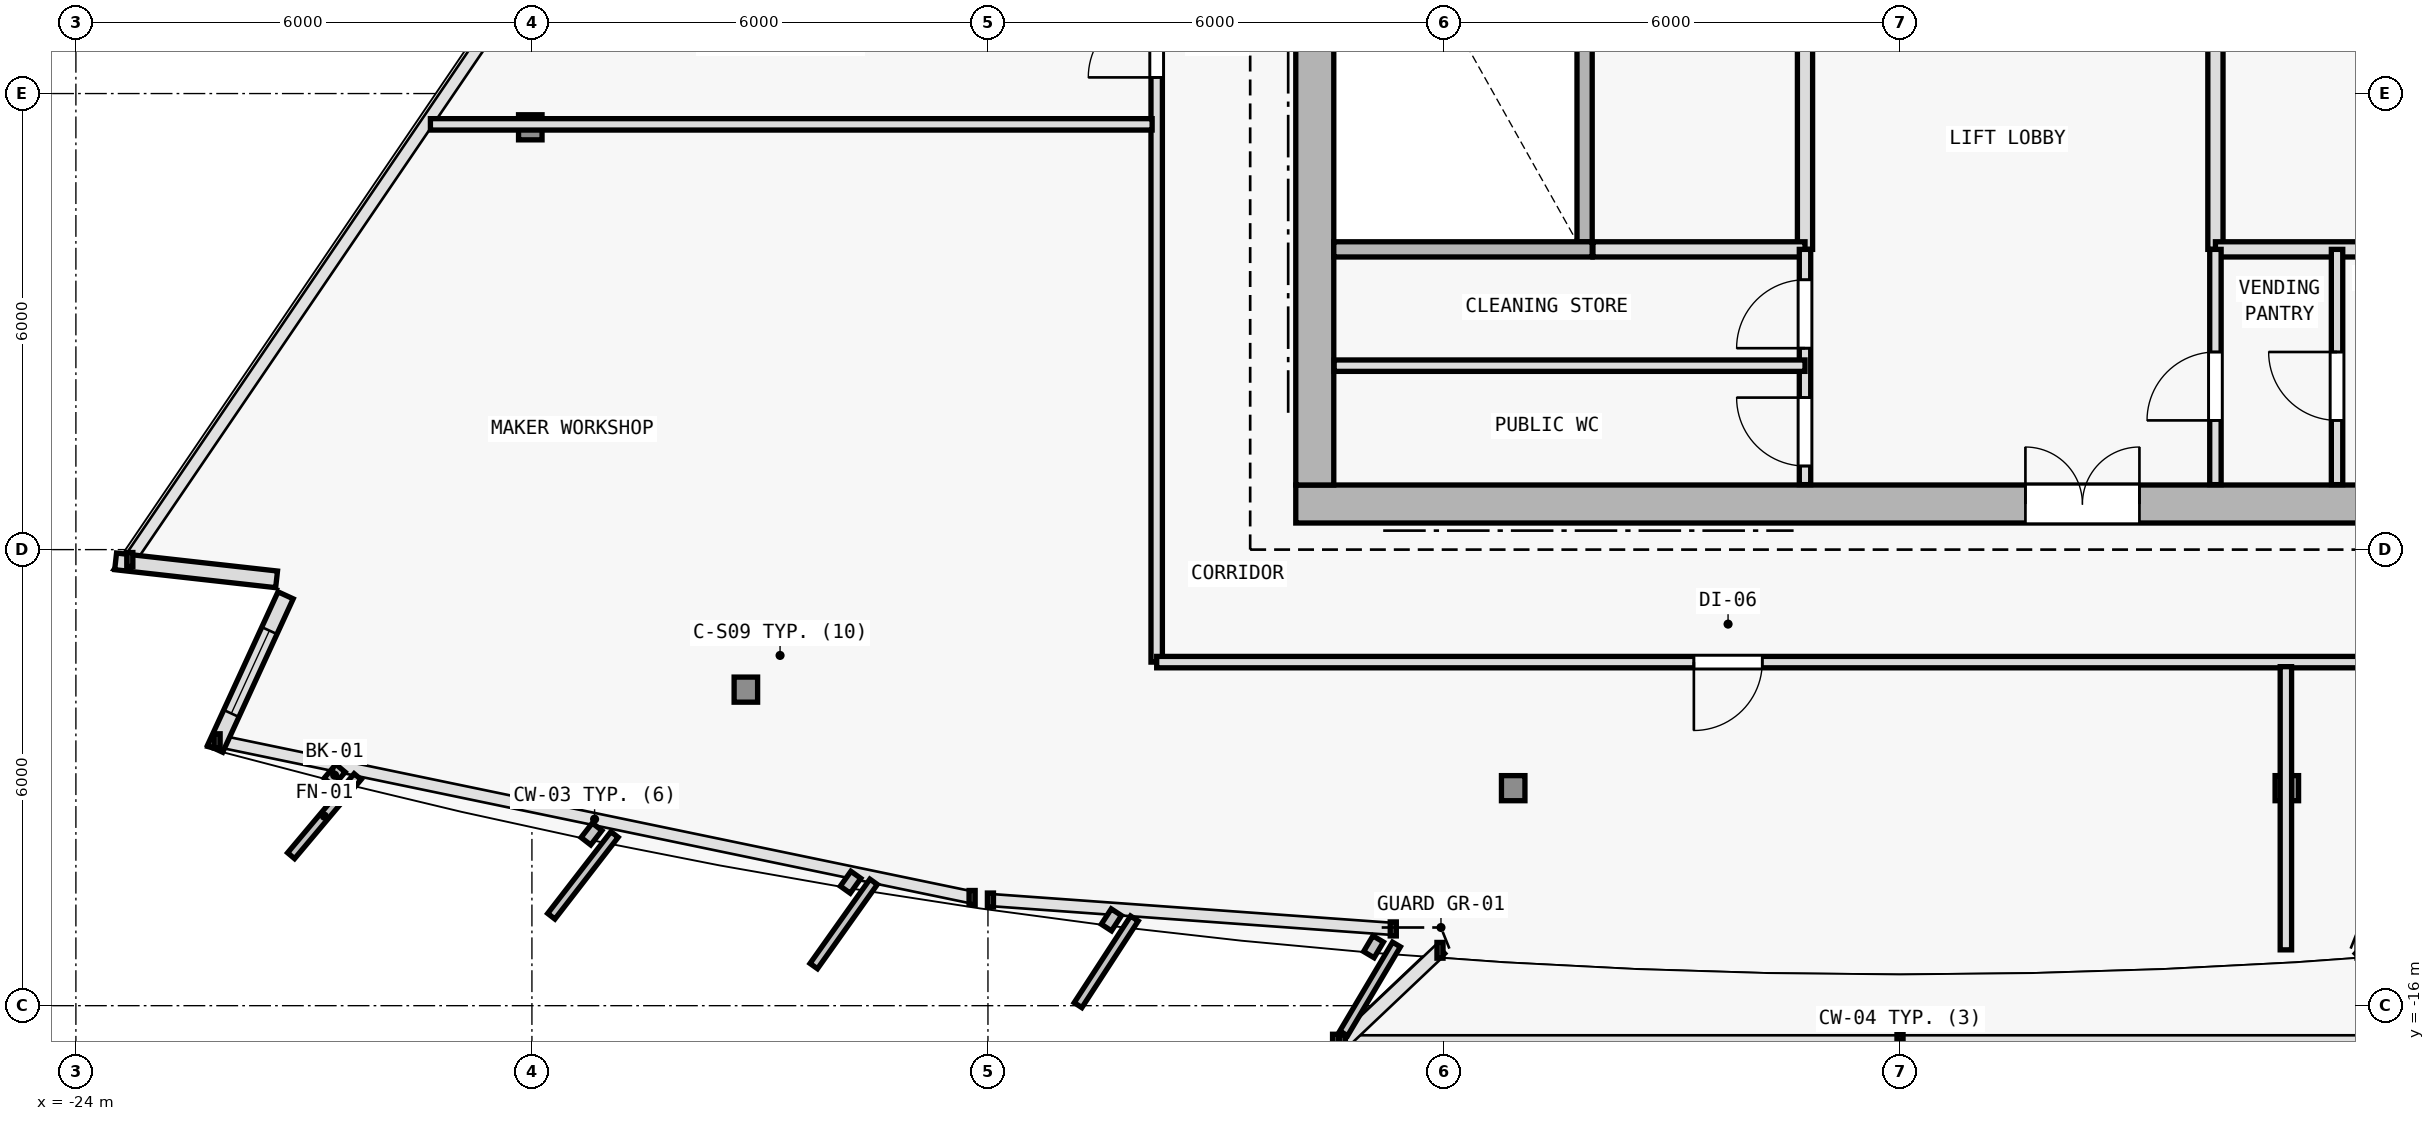
"""IFC4 building model, lengths in metres.
Left out: names, types, materials, properties, quantities, classifications, styles, units other than length and angle.
Written with IfcOpenShell. Run it as: python <this file> out.ifc"""

import sys

from ifc_helpers import new_model, si_unit, direction, frame, frame_2d, origin, origin_2d, place, context, subcontext, project, spatial, rectangle, i_section, extrude, element, fill, save


model = new_model("IFC4")
c1 = context("Model", 3, precision=1e-05, world=origin(), true_north=direction((0.0, 1.0)))
c2 = subcontext(c1, "Body", "Model", "MODEL_VIEW")
j1 = project(units=[si_unit("LENGTHUNIT", "METRE"), si_unit("PLANEANGLEUNIT", "RADIAN")], contexts=[c1])
p1 = place(None, origin())
s1 = spatial("IfcSite", under=j1, at=p1, CompositionType="ELEMENT")
p2 = place(p1, origin())
s2 = spatial("IfcBuilding", under=s1, at=p2, CompositionType="ELEMENT")
p3 = place(p2, frame((0.0, 0.0, 286.8)))
s3 = spatial("IfcBuildingStorey", under=s2, at=p3, CompositionType="ELEMENT", Elevation=286.8)
for number, where, z_axis, x_axis in (
    (1, (-7.7, -9.4, 0.0), (0.0, 0.0, 1.0), (1.0, 0.0, 0.0)),
    (2, (0.0, -9.4, 0.0), (0.0, 0.0, 1.0), (1.0, 0.0, 0.0)),
):
    element("IfcColumn", number, at=place(p3, frame(where, z_axis=z_axis, x_axis=x_axis)), inside=s3, PredefinedType="COLUMN", context=c2, shape_type="SweptSolid", body=[
        extrude(i_section(OverallWidth=0.374, OverallDepth=0.372, WebThickness=0.012, FlangeThickness=0.02, FilletRadius=0.015, at=origin_2d()), origin(), (0.0, 0.0, 1.0), 3.6),
    ])
p4 = place(p3, frame((-15.185, -11.842, 0.005), z_axis=(0.020662834962, 0.033509136961, 0.999224792022), x_axis=(-0.851183725565, 0.524867855115, 0.0)))
e3 = element("IfcColumn", 3, at=p4, inside=s3, PredefinedType="COLUMN", context=c2, shape_type="SweptSolid", body=[
    extrude(i_section(OverallWidth=0.309, OverallDepth=0.33, WebThickness=0.011, FlangeThickness=0.019, FilletRadius=0.027, at=origin_2d()), origin(), (0.0, 0.0, 1.0), 3.592),
])
for number, where, z_axis, x_axis in (
    (4, (-5.089, -13.138, 0.005), (0.007, 0.035, 0.999), (-0.982, 0.191, 0.0)),
    (5, (5.089, -13.138, 0.005), (-0.007, 0.035, 0.999), (-0.982, -0.191, 0.0)),
):
    element("IfcColumn", number, at=place(p3, frame(where, z_axis=z_axis, x_axis=x_axis)), inside=s3, PredefinedType="COLUMN", context=c2, shape_type="SweptSolid", body=[
        extrude(i_section(OverallWidth=0.309, OverallDepth=0.33, WebThickness=0.011, FlangeThickness=0.019, FilletRadius=0.027, at=origin_2d()), origin(), (0.0, 0.0, 1.0), 3.592),
    ])
p5 = place(p3, frame((-18.021, -4.444, 0.005), z_axis=(0.025222449659, 0.021619242565, 0.999448065876), x_axis=(-0.650791373456, 0.759256602365, 0.0)))
e6 = element("IfcColumn", 6, at=p5, inside=s3, PredefinedType="COLUMN", context=c2, shape_type="SweptSolid", body=[
    extrude(i_section(OverallWidth=0.309, OverallDepth=0.33, WebThickness=0.011, FlangeThickness=0.019, FilletRadius=0.027, at=origin_2d()), origin(), (0.0, 0.0, 1.0), 3.591),
])
p6 = place(p3, frame((-21.36, -10.391, 0.0), z_axis=(0.0, 0.0, 1.0), x_axis=(-0.993817888275, 0.111022542511, 0.0)))
e7 = element("IfcWall", 7, at=p6, inside=s3, PredefinedType="SOLIDWALL", context=c2, shape_type="SweptSolid", body=[
    extrude(rectangle(XDim=2.131, YDim=0.22, at=frame_2d((1.065, 0.0))), origin(), (0.0, 0.0, 1.0), 3.35),
])
p7 = place(p3, frame((-22.168, -12.62, 0.0), z_axis=(0.0, 0.0, 1.0), x_axis=(0.417426589535, 0.908710648308, 0.0)))
e8 = element("IfcWall", 8, at=p7, inside=s3, PredefinedType="SOLIDWALL", context=c2, shape_type="SweptSolid", body=[
    extrude(rectangle(XDim=2.221, YDim=0.22, at=frame_2d((1.111, 0.0))), origin(), (0.0, 0.0, 1.0), 3.35),
])
p8 = place(p7, frame((0.511, 0.0, 0.62)))
e9 = element("IfcOpeningElement", 9, at=p8, cuts=e8, PredefinedType="OPENING", context=c2, shape_type="SweptSolid", body=[
    extrude(rectangle(XDim=1.2, YDim=1.8, at=frame_2d((0.6, 0.9))), frame((0.0, 0.12, 0.0), z_axis=(0.0, -1.0, 0.0), x_axis=(1.0, 0.0, 0.0)), (0.0, 0.0, 1.0), 0.24),
])
p9 = place(p3, frame((-7.95, -9.4, 0.0), z_axis=(0.0, 0.0, 1.0), x_axis=(1.0, 0.0, 0.0)))
e10 = element("IfcWall", 10, at=p9, inside=s3, PredefinedType="SHEAR", context=c2, shape_type="SweptSolid", body=[
    extrude(rectangle(XDim=15.9, YDim=0.5, at=frame_2d((7.95, 0.0))), origin(), (0.0, 0.0, 1.0), 3.35),
])
p10 = place(p9, frame((9.6, 0.0, 0.0)))
e11 = element("IfcOpeningElement", 11, at=p10, cuts=e10, PredefinedType="OPENING", context=c2, shape_type="SweptSolid", body=[
    extrude(rectangle(XDim=1.5, YDim=2.2, at=frame_2d((0.75, 1.1))), frame((0.0, 0.26, 0.0), z_axis=(0.0, -1.0, 0.0), x_axis=(1.0, 0.0, 0.0)), (0.0, 0.0, 1.0), 0.52),
])
p11 = place(p3, frame((-7.7, -9.15, 0.0), z_axis=(0.0, 0.0, 1.0), x_axis=(0.0, 1.0, 0.0)))
e12 = element("IfcWall", 12, at=p11, inside=s3, PredefinedType="SHEAR", context=c2, shape_type="SweptSolid", body=[
    extrude(rectangle(XDim=19.1, YDim=0.5, at=frame_2d((9.55, 0.0))), origin(), (0.0, 0.0, 1.0), 3.35),
])
p12 = place(p11, frame((12.7, 0.0, 0.0)))
e13 = element("IfcOpeningElement", 13, at=p12, cuts=e12, PredefinedType="OPENING", context=c2, shape_type="SweptSolid", body=[
    extrude(rectangle(XDim=1.1, YDim=2.15, at=frame_2d((0.55, 1.075))), frame((0.0, 0.26, 0.0), z_axis=(0.0, -1.0, 0.0), x_axis=(1.0, 0.0, 0.0)), (0.0, 0.0, 1.0), 0.52),
])
p13 = place(p3, frame((-4.15, -5.95, 0.0), z_axis=(0.0, 0.0, 1.0), x_axis=(0.0, 1.0, 0.0)))
e14 = element("IfcWall", 14, at=p13, inside=s3, PredefinedType="SOLIDWALL", context=c2, shape_type="SweptSolid", body=[
    extrude(rectangle(XDim=7.2, YDim=0.2, at=frame_2d((3.6, 0.0))), origin(), (0.0, 0.0, 1.0), 3.35),
])
p14 = place(p3, frame((4.15, -6.05, 0.0), z_axis=(0.0, 0.0, 1.0), x_axis=(0.0, 1.0, 0.0)))
e15 = element("IfcWall", 15, at=p14, inside=s3, PredefinedType="SOLIDWALL", context=c2, shape_type="SweptSolid", body=[
    extrude(rectangle(XDim=8.7, YDim=0.2, at=frame_2d((4.35, 0.0))), origin(), (0.0, 0.0, 1.0), 3.35),
])
p15 = place(p14, frame((3.6, 0.0, 0.0)))
e16 = element("IfcOpeningElement", 16, at=p15, cuts=e15, PredefinedType="OPENING", context=c2, shape_type="SweptSolid", body=[
    extrude(rectangle(XDim=0.95, YDim=2.1, at=frame_2d((0.475, 1.05))), frame((0.0, 0.11, 0.0), z_axis=(0.0, -1.0, 0.0), x_axis=(1.0, 0.0, 0.0)), (0.0, 0.0, 1.0), 0.22),
])
p16 = place(p3, frame((-1.25, -6.05, 0.0), z_axis=(0.0, 0.0, 1.0), x_axis=(0.0, 1.0, 0.0)))
e17 = element("IfcWall", 17, at=p16, inside=s3, PredefinedType="SOLIDWALL", context=c2, shape_type="SweptSolid", body=[
    extrude(rectangle(XDim=8.7, YDim=0.2, at=frame_2d((4.35, 0.0))), origin(), (0.0, 0.0, 1.0), 3.35),
])
p17 = place(p16, frame((3.4, 0.0, 0.0)))
e18 = element("IfcOpeningElement", 18, at=p17, cuts=e17, PredefinedType="OPENING", context=c2, shape_type="SweptSolid", body=[
    extrude(rectangle(XDim=0.95, YDim=2.1, at=frame_2d((0.475, 1.05))), frame((0.0, 0.11, 0.0), z_axis=(0.0, -1.0, 0.0), x_axis=(1.0, 0.0, 0.0)), (0.0, 0.0, 1.0), 0.22),
])
p18 = place(p3, frame((-7.45, -6.05, 0.0), z_axis=(0.0, 0.0, 1.0), x_axis=(1.0, 0.0, 0.0)))
e19 = element("IfcWall", 19, at=p18, inside=s3, PredefinedType="SOLIDWALL", context=c2, shape_type="SweptSolid", body=[
    extrude(rectangle(XDim=3.4, YDim=0.2, at=frame_2d((1.7, 0.0))), origin(), (0.0, 0.0, 1.0), 3.35),
])
p19 = place(p3, frame((-4.04, -6.05, 0.0), z_axis=(0.0, 0.0, 1.0), x_axis=(1.0, 0.0, 0.0)))
e20 = element("IfcWall", 20, at=p19, inside=s3, PredefinedType="SOLIDWALL", context=c2, shape_type="SweptSolid", body=[
    extrude(rectangle(XDim=2.79, YDim=0.2, at=frame_2d((1.395, 0.0))), origin(), (0.0, 0.0, 1.0), 3.35),
])
p20 = place(p3, frame((4.15, -6.05, 0.0), z_axis=(0.0, 0.0, 1.0), x_axis=(1.0, 0.0, 0.0)))
e21 = element("IfcWall", 21, at=p20, inside=s3, PredefinedType="SOLIDWALL", context=c2, shape_type="SweptSolid", body=[
    extrude(rectangle(XDim=3.295, YDim=0.2, at=frame_2d((1.647, 0.0))), origin(), (0.0, 0.0, 1.0), 3.35),
])
p21 = place(p3, frame((-1.25, -9.145, 0.0), z_axis=(0.0, 0.0, 1.0), x_axis=(0.0, 1.0, 0.0)))
e22 = element("IfcWall", 22, at=p21, inside=s3, PredefinedType="PARTITIONING", context=c2, shape_type="SweptSolid", body=[
    extrude(rectangle(XDim=3.095, YDim=0.15, at=frame_2d((1.547, 0.0))), origin(), (0.0, 0.0, 1.0), 3.35),
])
p22 = place(p21, frame((1.795, 0.0, 0.0)))
e23 = element("IfcOpeningElement", 23, at=p22, cuts=e22, PredefinedType="OPENING", context=c2, shape_type="SweptSolid", body=[
    extrude(rectangle(XDim=0.9, YDim=2.1, at=frame_2d((0.45, 1.05))), frame((0.0, 0.085, 0.0), z_axis=(0.0, -1.0, 0.0), x_axis=(1.0, 0.0, 0.0)), (0.0, 0.0, 1.0), 0.17),
])
p23 = place(p21, frame((0.245, 0.0, 0.0)))
e24 = element("IfcOpeningElement", 24, at=p23, cuts=e22, PredefinedType="OPENING", context=c2, shape_type="SweptSolid", body=[
    extrude(rectangle(XDim=0.9, YDim=2.1, at=frame_2d((0.45, 1.05))), frame((0.0, 0.085, 0.0), z_axis=(0.0, -1.0, 0.0), x_axis=(1.0, 0.0, 0.0)), (0.0, 0.0, 1.0), 0.17),
])
p24 = place(p3, frame((4.15, -9.145, 0.0), z_axis=(0.0, 0.0, 1.0), x_axis=(0.0, 1.0, 0.0)))
e25 = element("IfcWall", 25, at=p24, inside=s3, PredefinedType="PARTITIONING", context=c2, shape_type="SweptSolid", body=[
    extrude(rectangle(XDim=3.095, YDim=0.15, at=frame_2d((1.547, 0.0))), origin(), (0.0, 0.0, 1.0), 3.35),
])
p25 = place(p24, frame((0.845, 0.0, 0.0)))
e26 = element("IfcOpeningElement", 26, at=p25, cuts=e25, PredefinedType="OPENING", context=c2, shape_type="SweptSolid", body=[
    extrude(rectangle(XDim=0.9, YDim=2.1, at=frame_2d((0.45, 1.05))), frame((0.0, 0.085, 0.0), z_axis=(0.0, -1.0, 0.0), x_axis=(1.0, 0.0, 0.0)), (0.0, 0.0, 1.0), 0.17),
])
p26 = place(p3, frame((-7.445, -7.58, 0.0), z_axis=(0.0, 0.0, 1.0), x_axis=(1.0, 0.0, 0.0)))
e27 = element("IfcWall", 27, at=p26, inside=s3, PredefinedType="PARTITIONING", context=c2, shape_type="SweptSolid", body=[
    extrude(rectangle(XDim=6.195, YDim=0.15, at=frame_2d((3.098, 0.0))), origin(), (0.0, 0.0, 1.0), 3.35),
])
p27 = place(p3, frame((5.75, -9.145, 0.0), z_axis=(0.0, 0.0, 1.0), x_axis=(0.0, 1.0, 0.0)))
e28 = element("IfcWall", 28, at=p27, inside=s3, PredefinedType="PARTITIONING", context=c2, shape_type="SweptSolid", body=[
    extrude(rectangle(XDim=3.095, YDim=0.15, at=frame_2d((1.547, 0.0))), origin(), (0.0, 0.0, 1.0), 3.35),
])
p28 = place(p27, frame((0.845, 0.0, 0.0)))
e29 = element("IfcOpeningElement", 29, at=p28, cuts=e28, PredefinedType="OPENING", context=c2, shape_type="SweptSolid", body=[
    extrude(rectangle(XDim=0.9, YDim=2.1, at=frame_2d((0.45, 1.05))), frame((0.0, 0.085, 0.0), z_axis=(0.0, -1.0, 0.0), x_axis=(1.0, 0.0, 0.0)), (0.0, 0.0, 1.0), 0.17),
])
p29 = place(p3, frame((-9.78, -11.48, 0.0), z_axis=(0.0, 0.0, 1.0), x_axis=(0.0, 1.0, 0.0)))
e30 = element("IfcWall", 30, at=p29, inside=s3, PredefinedType="PARTITIONING", context=c2, shape_type="SweptSolid", body=[
    extrude(rectangle(XDim=19.706, YDim=0.15, at=frame_2d((9.853, 0.0))), origin(), (0.0, 0.0, 1.0), 2.875),
])
p30 = place(p29, frame((9.901, 0.0, 0.0)))
e31 = element("IfcOpeningElement", 31, at=p30, cuts=e30, PredefinedType="OPENING", context=c2, shape_type="SweptSolid", body=[
    extrude(rectangle(XDim=0.9, YDim=2.1, at=frame_2d((0.45, 1.05))), frame((0.0, 0.085, 0.0), z_axis=(0.0, -1.0, 0.0), x_axis=(1.0, 0.0, 0.0)), (0.0, 0.0, 1.0), 0.17),
])
p31 = place(p29, frame((7.692, 0.0, 0.0)))
e32 = element("IfcOpeningElement", 32, at=p31, cuts=e30, PredefinedType="OPENING", context=c2, shape_type="SweptSolid", body=[
    extrude(rectangle(XDim=0.9, YDim=2.1, at=frame_2d((0.45, 1.05))), frame((0.0, 0.085, 0.0), z_axis=(0.0, -1.0, 0.0), x_axis=(1.0, 0.0, 0.0)), (0.0, 0.0, 1.0), 0.17),
])
p32 = place(p29, frame((14.208, 0.0, 0.0)))
e33 = element("IfcOpeningElement", 33, at=p32, cuts=e30, PredefinedType="OPENING", context=c2, shape_type="SweptSolid", body=[
    extrude(rectangle(XDim=0.9, YDim=2.1, at=frame_2d((0.45, 1.05))), frame((0.0, 0.085, 0.0), z_axis=(0.0, -1.0, 0.0), x_axis=(1.0, 0.0, 0.0)), (0.0, 0.0, 1.0), 0.17),
])
p33 = place(p29, frame((11.926, 0.0, 0.0)))
e34 = element("IfcOpeningElement", 34, at=p33, cuts=e30, PredefinedType="OPENING", context=c2, shape_type="SweptSolid", body=[
    extrude(rectangle(XDim=0.85, YDim=2.1, at=frame_2d((0.425, 1.05))), frame((0.0, 0.085, 0.0), z_axis=(0.0, -1.0, 0.0), x_axis=(1.0, 0.0, 0.0)), (0.0, 0.0, 1.0), 0.17),
])
p34 = place(p3, frame((9.78, -11.48, 0.0), z_axis=(0.0, 0.0, 1.0), x_axis=(-1.0, 0.0, 0.0)))
e35 = element("IfcWall", 35, at=p34, inside=s3, PredefinedType="PARTITIONING", context=c2, shape_type="SweptSolid", body=[
    extrude(rectangle(XDim=19.56, YDim=0.15, at=frame_2d((9.78, 0.0))), origin(), (0.0, 0.0, 1.0), 2.965),
])
p35 = place(p34, frame((11.592, 0.0, 0.0)))
e36 = element("IfcOpeningElement", 36, at=p35, cuts=e35, PredefinedType="OPENING", context=c2, shape_type="SweptSolid", body=[
    extrude(rectangle(XDim=0.9, YDim=2.1, at=frame_2d((0.45, 1.05))), frame((0.0, 0.085, 0.0), z_axis=(0.0, -1.0, 0.0), x_axis=(1.0, 0.0, 0.0)), (0.0, 0.0, 1.0), 0.17),
])
p36 = place(p34, frame((1.991, 0.0, 0.0)))
e37 = element("IfcOpeningElement", 37, at=p36, cuts=e35, PredefinedType="OPENING", context=c2, shape_type="SweptSolid", body=[
    extrude(rectangle(XDim=0.9, YDim=2.1, at=frame_2d((0.45, 1.05))), frame((0.0, 0.085, 0.0), z_axis=(0.0, -1.0, 0.0), x_axis=(1.0, 0.0, 0.0)), (0.0, 0.0, 1.0), 0.17),
])
p37 = place(p3, frame((5.077, -11.54, 0.0), z_axis=(0.0, 0.0, 1.0), x_axis=(0.0, -1.0, 0.0)))
e38 = element("IfcWall", 38, at=p37, inside=s3, PredefinedType="PARTITIONING", context=c2, shape_type="SweptSolid", body=[
    extrude(rectangle(XDim=3.725, YDim=0.15, at=frame_2d((1.863, 0.0))), origin(), (0.0, 0.0, 1.0), 2.775),
])
p38 = place(p3, frame((-9.84, -4.405, 0.0), z_axis=(0.0, 0.0, 1.0), x_axis=(-1.0, 0.0, 0.0)))
e39 = element("IfcWall", 39, at=p38, inside=s3, PredefinedType="PARTITIONING", context=c2, shape_type="SweptSolid", body=[
    extrude(rectangle(XDim=9.496, YDim=0.15, at=frame_2d((4.748, 0.0))), origin(), (0.0, 0.0, 1.0), 2.875),
])
p39 = place(p8, origin())
e40 = element("IfcWindow", 40, at=p39, inside=s3, PartitioningType="SINGLE_PANEL", PredefinedType="WINDOW", context=c2, shape_type="SweptSolid", body=[
    extrude(rectangle(XDim=1.2, YDim=1.8, at=frame_2d((0.6, 0.9))), frame((0.0, 0.03, 0.0), z_axis=(0.0, -1.0, 0.0), x_axis=(1.0, 0.0, 0.0)), (0.0, 0.0, 1.0), 0.06),
])
fill(e9, e40)
p40 = place(p10, origin())
e41 = element("IfcDoor", 41, at=p40, inside=s3, OperationType="DOUBLE_DOOR_SINGLE_SWING", PredefinedType="DOOR", context=c2, shape_type="SweptSolid", body=[
    extrude(rectangle(XDim=1.5, YDim=2.2, at=frame_2d((0.75, 1.1))), frame((0.0, 0.025, 0.0), z_axis=(0.0, -1.0, 0.0), x_axis=(1.0, 0.0, 0.0)), (0.0, 0.0, 1.0), 0.05),
])
fill(e11, e41)
p41 = place(p22, origin())
e42 = element("IfcDoor", 42, at=p41, inside=s3, OperationType="SINGLE_SWING_LEFT", PredefinedType="DOOR", context=c2, shape_type="SweptSolid", body=[
    extrude(rectangle(XDim=0.9, YDim=2.1, at=frame_2d((0.45, 1.05))), frame((0.0, 0.025, 0.0), z_axis=(0.0, -1.0, 0.0), x_axis=(1.0, 0.0, 0.0)), (0.0, 0.0, 1.0), 0.05),
])
fill(e23, e42)
p42 = place(p23, origin())
e43 = element("IfcDoor", 43, at=p42, inside=s3, OperationType="SINGLE_SWING_RIGHT", PredefinedType="DOOR", context=c2, shape_type="SweptSolid", body=[
    extrude(rectangle(XDim=0.9, YDim=2.1, at=frame_2d((0.45, 1.05))), frame((0.0, 0.025, 0.0), z_axis=(0.0, -1.0, 0.0), x_axis=(1.0, 0.0, 0.0)), (0.0, 0.0, 1.0), 0.05),
])
fill(e24, e43)
p43 = place(p25, origin())
e44 = element("IfcDoor", 44, at=p43, inside=s3, OperationType="SINGLE_SWING_LEFT", PredefinedType="DOOR", context=c2, shape_type="SweptSolid", body=[
    extrude(rectangle(XDim=0.9, YDim=2.1, at=frame_2d((0.45, 1.05))), frame((0.0, 0.025, 0.0), z_axis=(0.0, -1.0, 0.0), x_axis=(1.0, 0.0, 0.0)), (0.0, 0.0, 1.0), 0.05),
])
fill(e26, e44)
p44 = place(p28, origin())
e45 = element("IfcDoor", 45, at=p44, inside=s3, OperationType="SINGLE_SWING_RIGHT", PredefinedType="DOOR", context=c2, shape_type="SweptSolid", body=[
    extrude(rectangle(XDim=0.9, YDim=2.1, at=frame_2d((0.45, 1.05))), frame((0.0, 0.025, 0.0), z_axis=(0.0, -1.0, 0.0), x_axis=(1.0, 0.0, 0.0)), (0.0, 0.0, 1.0), 0.05),
])
fill(e29, e45)
p45 = place(p31, origin())
e46 = element("IfcDoor", 46, at=p45, inside=s3, OperationType="SINGLE_SWING_LEFT", PredefinedType="DOOR", context=c2, shape_type="SweptSolid", body=[
    extrude(rectangle(XDim=0.9, YDim=2.1, at=frame_2d((0.45, 1.05))), frame((0.0, 0.025, 0.0), z_axis=(0.0, -1.0, 0.0), x_axis=(1.0, 0.0, 0.0)), (0.0, 0.0, 1.0), 0.05),
])
fill(e32, e46)
p46 = place(p35, origin())
e47 = element("IfcDoor", 47, at=p46, inside=s3, OperationType="SINGLE_SWING_RIGHT", PredefinedType="DOOR", context=c2, shape_type="SweptSolid", body=[
    extrude(rectangle(XDim=0.9, YDim=2.1, at=frame_2d((0.45, 1.05))), frame((0.0, 0.025, 0.0), z_axis=(0.0, -1.0, 0.0), x_axis=(1.0, 0.0, 0.0)), (0.0, 0.0, 1.0), 0.05),
])
fill(e36, e47)
save(model, sys.argv[1])
